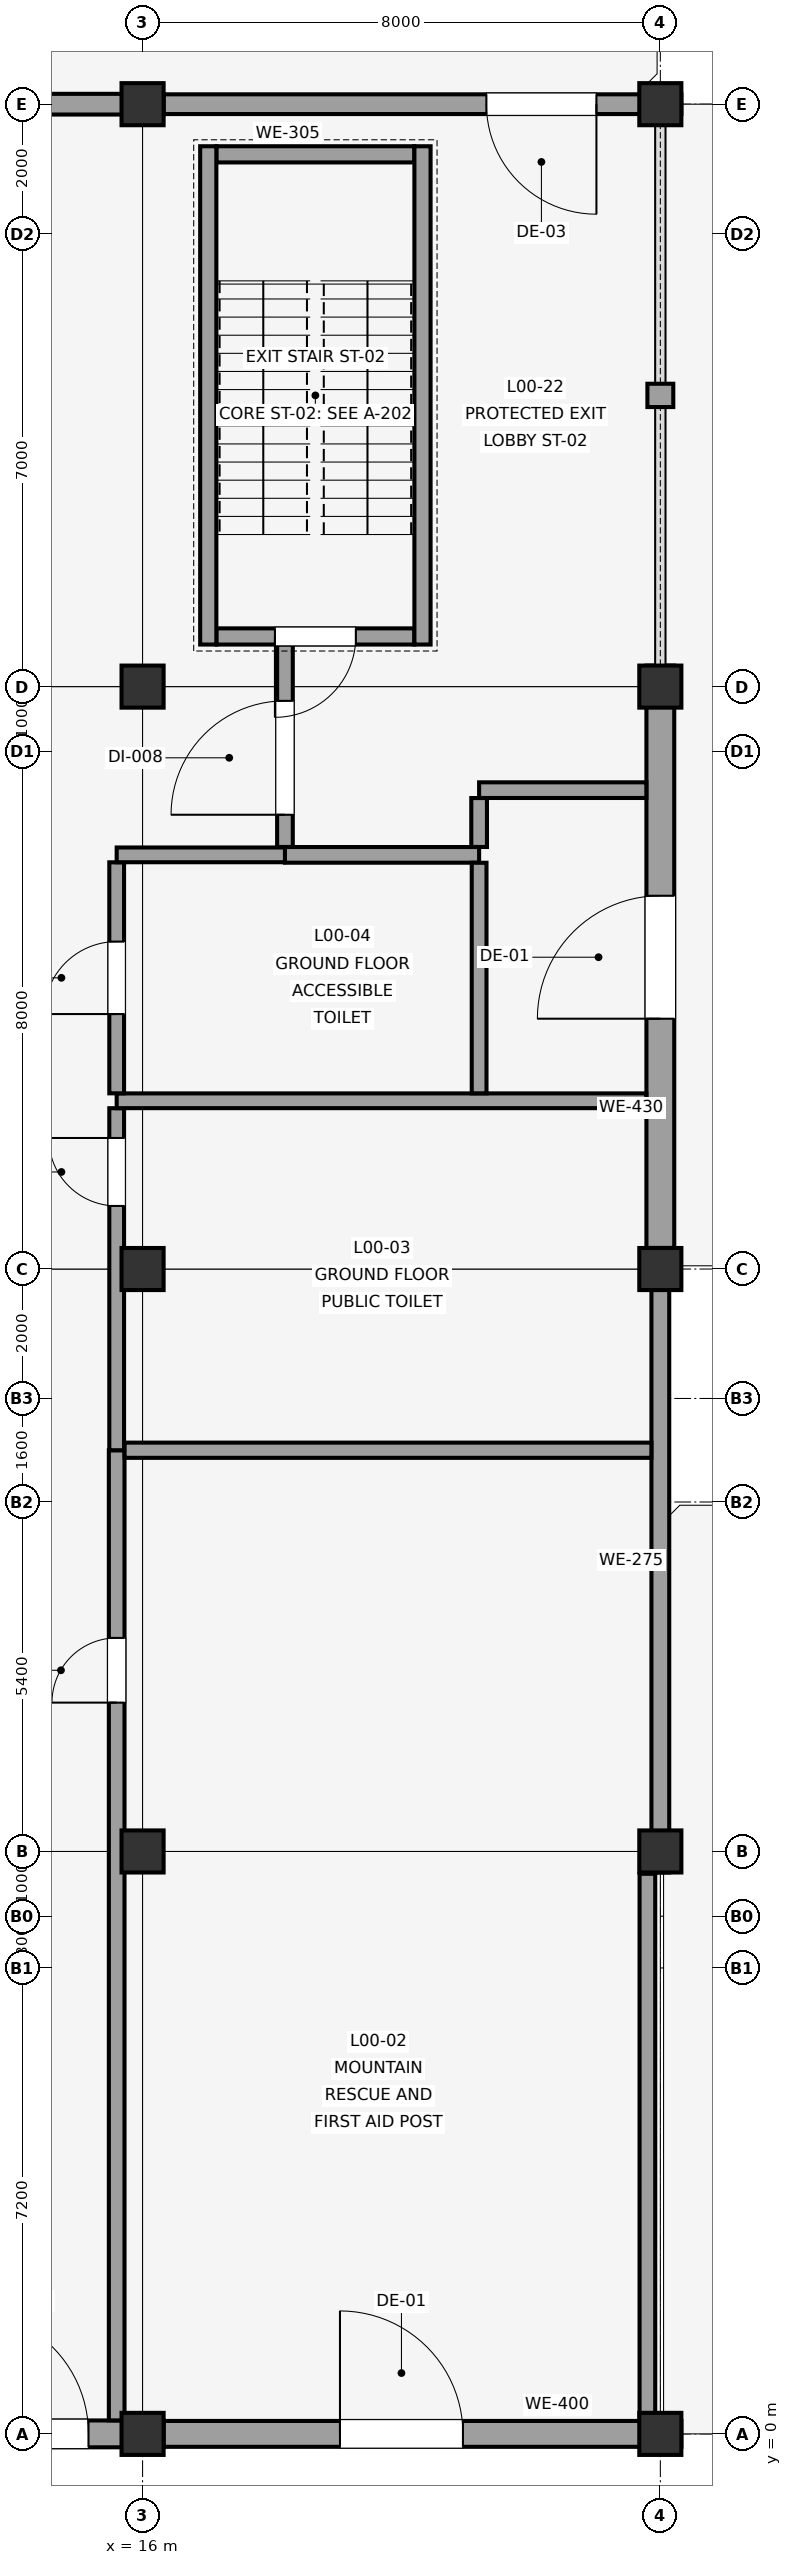
"""IFC4 building model, lengths in metres.
Left out: names, types, materials, properties, quantities, classifications, styles, units other than length and angle.
Written with IfcOpenShell. Run it as: python <this file> out.ifc"""

import sys

from ifc_helpers import new_model, si_unit, direction, frame, frame_2d, origin, origin_2d, place, context, subcontext, project, spatial, rectangle, extrude, element, fill, save


model = new_model("IFC4")
c1 = context("Model", 3, precision=1e-05, world=origin(), true_north=direction((0.0, 1.0)))
c2 = subcontext(c1, "Body", "Model", "MODEL_VIEW")
j1 = project(units=[si_unit("LENGTHUNIT", "METRE"), si_unit("PLANEANGLEUNIT", "RADIAN")], contexts=[c1])
p1 = place(None, origin())
s1 = spatial("IfcSite", under=j1, at=p1, CompositionType="ELEMENT")
p2 = place(p1, origin())
s2 = spatial("IfcBuilding", under=s1, at=p2, CompositionType="ELEMENT")
p3 = place(p2, origin())
s3 = spatial("IfcBuildingStorey", under=s2, at=p3, CompositionType="ELEMENT", Elevation=0.0)
for number, where, z_axis, x_axis in (
    (1, (16.0, 0.0, 0.0), (0.0, 0.0, 1.0), (1.0, 0.0, 0.0)),
    (2, (16.0, 9.0, 0.0), (0.0, 0.0, 1.0), (1.0, 0.0, 0.0)),
    (3, (16.0, 18.0, 0.0), (0.0, 0.0, 1.0), (1.0, 0.0, 0.0)),
    (4, (16.0, 27.0, 0.0), (0.0, 0.0, 1.0), (1.0, 0.0, 0.0)),
    (5, (16.0, 36.0, 0.0), (0.0, 0.0, 1.0), (1.0, 0.0, 0.0)),
    (6, (24.0, 0.0, 0.0), (0.0, 0.0, 1.0), (1.0, 0.0, 0.0)),
    (7, (24.0, 9.0, 0.0), (0.0, 0.0, 1.0), (1.0, 0.0, 0.0)),
    (8, (24.0, 18.0, 0.0), (0.0, 0.0, 1.0), (1.0, 0.0, 0.0)),
    (9, (24.0, 27.0, 0.0), (0.0, 0.0, 1.0), (1.0, 0.0, 0.0)),
    (10, (24.0, 36.0, 0.0), (0.0, 0.0, 1.0), (1.0, 0.0, 0.0)),
):
    element("IfcColumn", number, at=place(p3, frame(where, z_axis=z_axis, x_axis=x_axis)), inside=s3, PredefinedType="COLUMN", context=c2, shape_type="SweptSolid", body=[
        extrude(rectangle(XDim=0.65, YDim=0.65, at=origin_2d()), origin(), (0.0, 0.0, 1.0), 4.5),
    ])
p4 = place(p3, frame((7.675, 0.0, 0.0), z_axis=(0.0, 0.0, 1.0), x_axis=(1.0, 0.0, 0.0)))
e11 = element("IfcWall", 11, at=p4, inside=s3, PredefinedType="SOLIDWALL", context=c2, shape_type="SweptSolid", body=[
    extrude(rectangle(XDim=8.65, YDim=0.415, at=frame_2d((4.325, 0.0))), origin(), (0.0, 0.0, 1.0), 3.12),
])
p5 = place(p4, frame((5.589, 0.0, 0.0)))
e12 = element("IfcOpeningElement", 12, at=p5, cuts=e11, PredefinedType="OPENING", context=c2, shape_type="SweptSolid", body=[
    extrude(rectangle(XDim=1.9, YDim=2.4, at=frame_2d((0.95, 1.2))), frame((0.0, 0.218, 0.0), z_axis=(0.0, -1.0, 0.0), x_axis=(1.0, 0.0, 0.0)), (0.0, 0.0, 1.0), 0.435),
])
p6 = place(p3, frame((16.326, 0.0, 0.0), z_axis=(0.0, 0.0, 1.0), x_axis=(1.0, 0.0, 0.0)))
e13 = element("IfcWall", 13, at=p6, inside=s3, PredefinedType="SOLIDWALL", context=c2, shape_type="SweptSolid", body=[
    extrude(rectangle(XDim=7.999, YDim=0.4, at=frame_2d((4.0, 0.0))), origin(), (0.0, 0.0, 1.0), 3.12),
])
p7 = place(p6, frame((2.724, 0.0, 0.0)))
e14 = element("IfcOpeningElement", 14, at=p7, cuts=e13, PredefinedType="OPENING", context=c2, shape_type="SweptSolid", body=[
    extrude(rectangle(XDim=1.9, YDim=2.4, at=frame_2d((0.95, 1.2))), frame((0.0, 0.21, 0.0), z_axis=(0.0, -1.0, 0.0), x_axis=(1.0, 0.0, 0.0)), (0.0, 0.0, 1.0), 0.42),
])
p8 = place(p3, frame((16.325, 36.0, 0.0), z_axis=(0.0, 0.0, 1.0), x_axis=(-1.0, 0.0, 0.0)))
e15 = element("IfcWall", 15, at=p8, inside=s3, PredefinedType="SOLIDWALL", context=c2, shape_type="SweptSolid", body=[
    extrude(rectangle(XDim=8.65, YDim=0.32, at=frame_2d((4.325, 0.0))), origin(), (0.0, 0.0, 1.0), 3.12),
])
p9 = place(p3, frame((24.325, 36.0, 0.0), z_axis=(0.0, 0.0, 1.0), x_axis=(-1.0, 0.0, 0.0)))
e16 = element("IfcWall", 16, at=p9, inside=s3, PredefinedType="SOLIDWALL", context=c2, shape_type="SweptSolid", body=[
    extrude(rectangle(XDim=7.999, YDim=0.305, at=frame_2d((4.0, 0.0))), origin(), (0.0, 0.0, 1.0), 3.12),
])
p10 = place(p9, frame((1.312, 0.0, 0.0)))
e17 = element("IfcOpeningElement", 17, at=p10, cuts=e16, PredefinedType="OPENING", context=c2, shape_type="SweptSolid", body=[
    extrude(rectangle(XDim=1.7, YDim=2.35, at=frame_2d((0.85, 1.175))), frame((0.0, 0.162, 0.0), z_axis=(0.0, -1.0, 0.0), x_axis=(1.0, 0.0, 0.0)), (0.0, 0.0, 1.0), 0.325),
])
p11 = place(p3, frame((24.0, 8.675, 0.0), z_axis=(0.0, 0.0, 1.0), x_axis=(0.0, 1.0, 0.0)))
e18 = element("IfcWall", 18, at=p11, inside=s3, PredefinedType="SOLIDWALL", context=c2, shape_type="SweptSolid", body=[
    extrude(rectangle(XDim=9.65, YDim=0.275, at=frame_2d((4.825, 0.0))), origin(), (0.0, 0.0, 1.0), 3.12),
])
p12 = place(p3, frame((24.0, 18.326, 0.0), z_axis=(0.0, 0.0, 1.0), x_axis=(0.0, 1.0, 0.0)))
e19 = element("IfcWall", 19, at=p12, inside=s3, PredefinedType="SOLIDWALL", context=c2, shape_type="SweptSolid", body=[
    extrude(rectangle(XDim=8.999, YDim=0.43, at=frame_2d((4.5, 0.0))), origin(), (0.0, 0.0, 1.0), 3.12),
])
p13 = place(p12, frame((3.542, 0.0, 0.0)))
e20 = element("IfcOpeningElement", 20, at=p13, cuts=e19, PredefinedType="OPENING", context=c2, shape_type="SweptSolid", body=[
    extrude(rectangle(XDim=1.9, YDim=2.4, at=frame_2d((0.95, 1.2))), frame((0.0, 0.225, 0.0), z_axis=(0.0, -1.0, 0.0), x_axis=(1.0, 0.0, 0.0)), (0.0, 0.0, 1.0), 0.45),
])
p14 = place(p3, frame((24.0, 31.32, 0.0), z_axis=(0.0, 0.0, 1.0), x_axis=(0.0, 1.0, 0.0)))
e21 = element("IfcWall", 21, at=p14, inside=s3, PredefinedType="SOLIDWALL", context=c2, shape_type="SweptSolid", body=[
    extrude(rectangle(XDim=0.36, YDim=0.4, at=frame_2d((0.18, 0.0))), origin(), (0.0, 0.0, 1.0), 3.12),
])
p15 = place(p3, frame((20.2, 27.775, 0.0), z_axis=(0.0, 0.0, 1.0), x_axis=(-1.0, 0.0, 0.0)))
e22 = element("IfcWall", 22, at=p15, inside=s3, PredefinedType="SHEAR", context=c2, shape_type="SweptSolid", body=[
    extrude(rectangle(XDim=3.06, YDim=0.25, at=frame_2d((1.53, 0.0))), origin(), (0.0, 0.0, 1.0), 4.5),
])
p16 = place(p15, frame((0.905, 0.0, 0.0)))
e23 = element("IfcOpeningElement", 23, at=p16, cuts=e22, PredefinedType="OPENING", context=c2, shape_type="SweptSolid", body=[
    extrude(rectangle(XDim=1.25, YDim=2.15, at=frame_2d((0.625, 1.075))), frame((0.0, 0.135, 0.0), z_axis=(0.0, -1.0, 0.0), x_axis=(1.0, 0.0, 0.0)), (0.0, 0.0, 1.0), 0.27),
])
p17 = place(p3, frame((20.2, 35.225, 0.0), z_axis=(0.0, 0.0, 1.0), x_axis=(-1.0, 0.0, 0.0)))
e24 = element("IfcWall", 24, at=p17, inside=s3, PredefinedType="SHEAR", context=c2, shape_type="SweptSolid", body=[
    extrude(rectangle(XDim=3.06, YDim=0.25, at=frame_2d((1.53, 0.0))), origin(), (0.0, 0.0, 1.0), 4.5),
])
for number, where, z_axis, x_axis in (
    (25, (20.325, 27.65, 0.0), (0.0, 0.0, 1.0), (0.0, 1.0, 0.0)),
    (26, (17.015, 27.65, 0.0), (0.0, 0.0, 1.0), (0.0, 1.0, 0.0)),
):
    element("IfcWall", number, at=place(p3, frame(where, z_axis=z_axis, x_axis=x_axis)), inside=s3, PredefinedType="SHEAR", context=c2, shape_type="SweptSolid", body=[
        extrude(rectangle(XDim=7.7, YDim=0.25, at=frame_2d((3.85, 0.0))), origin(), (0.0, 0.0, 1.0), 4.5),
    ])
p18 = place(p3, frame((18.2, 24.522, 0.0), z_axis=(0.0, 0.0, 1.0), x_axis=(0.0, 1.0, 0.0)))
e27 = element("IfcWall", 27, at=p18, inside=s3, PredefinedType="SOLIDWALL", context=c2, shape_type="SweptSolid", body=[
    extrude(rectangle(XDim=3.127, YDim=0.242, at=frame_2d((1.563, 0.0))), origin(), (0.0, 0.0, 1.0), 2.7),
])
p19 = place(p18, frame((0.498, 0.0, 0.0)))
e28 = element("IfcOpeningElement", 28, at=p19, cuts=e27, PredefinedType="OPENING", context=c2, shape_type="SweptSolid", body=[
    extrude(rectangle(XDim=1.76, YDim=2.22, at=frame_2d((0.88, 1.11))), frame((0.0, 0.131, 0.0), z_axis=(0.0, -1.0, 0.0), x_axis=(1.0, 0.0, 0.0)), (0.0, 0.0, 1.0), 0.262),
])
p20 = place(p3, frame((23.784, 25.4, 0.0), z_axis=(0.0, 0.0, 1.0), x_axis=(-1.0, 0.0, 0.0)))
e29 = element("IfcWall", 29, at=p20, inside=s3, PredefinedType="SOLIDWALL", context=c2, shape_type="SweptSolid", body=[
    extrude(rectangle(XDim=2.584, YDim=0.242, at=frame_2d((1.292, 0.0))), origin(), (0.0, 0.0, 1.0), 2.7),
])
p21 = place(p3, frame((21.2, 25.278, 0.0), z_axis=(0.0, 0.0, 1.0), x_axis=(0.0, -1.0, 0.0)))
e30 = element("IfcWall", 30, at=p21, inside=s3, PredefinedType="SOLIDWALL", context=c2, shape_type="SweptSolid", body=[
    extrude(rectangle(XDim=0.756, YDim=0.242, at=frame_2d((0.378, 0.0))), origin(), (0.0, 0.0, 1.0), 2.7),
])
p22 = place(p3, frame((21.2, 24.4, 0.0), z_axis=(0.0, 0.0, 1.0), x_axis=(-1.0, 0.0, 0.0)))
e31 = element("IfcWall", 31, at=p22, inside=s3, PredefinedType="SOLIDWALL", context=c2, shape_type="SweptSolid", body=[
    extrude(rectangle(XDim=3.0, YDim=0.242, at=frame_2d((1.5, 0.0))), origin(), (0.0, 0.0, 1.0), 2.7),
])
p23 = place(p3, frame((15.6, 0.208, 0.0), z_axis=(0.0, 0.0, 1.0), x_axis=(0.0, 1.0, 0.0)))
e32 = element("IfcWall", 32, at=p23, inside=s3, PredefinedType="SOLIDWALL", context=c2, shape_type="SweptSolid", body=[
    extrude(rectangle(XDim=14.991, YDim=0.242, at=frame_2d((7.496, 0.0))), origin(), (0.0, 0.0, 1.0), 2.7),
])
p24 = place(p23, frame((11.092, 0.0, 0.0)))
e33 = element("IfcOpeningElement", 33, at=p24, cuts=e32, PredefinedType="OPENING", context=c2, shape_type="SweptSolid", body=[
    extrude(rectangle(XDim=1.0, YDim=2.15, at=frame_2d((0.5, 1.075))), frame((0.0, 0.131, 0.0), z_axis=(0.0, -1.0, 0.0), x_axis=(1.0, 0.0, 0.0)), (0.0, 0.0, 1.0), 0.262),
])
p25 = place(p3, frame((15.722, 15.2, 0.0), z_axis=(0.0, 0.0, 1.0), x_axis=(1.0, 0.0, 0.0)))
e34 = element("IfcWall", 34, at=p25, inside=s3, PredefinedType="PARTITIONING", context=c2, shape_type="SweptSolid", body=[
    extrude(rectangle(XDim=8.14, YDim=0.235, at=frame_2d((4.07, 0.0))), origin(), (0.0, 0.0, 1.0), 2.7),
])
p26 = place(p3, frame((23.8, 8.655, 0.0), z_axis=(0.0, 0.0, 1.0), x_axis=(0.0, -1.0, 0.0)))
e35 = element("IfcWall", 35, at=p26, inside=s3, PredefinedType="SOLIDWALL", context=c2, shape_type="SweptSolid", body=[
    extrude(rectangle(XDim=8.454, YDim=0.242, at=frame_2d((4.227, 0.0))), origin(), (0.0, 0.0, 1.0), 2.7),
])
p27 = place(p3, frame((15.6, 15.2, 0.0), z_axis=(0.0, 0.0, 1.0), x_axis=(0.0, 1.0, 0.0)))
e36 = element("IfcWall", 36, at=p27, inside=s3, PredefinedType="PLUMBINGWALL", context=c2, shape_type="SweptSolid", body=[
    extrude(rectangle(XDim=5.285, YDim=0.228, at=frame_2d((2.643, 0.0))), origin(), (0.0, 0.0, 1.0), 2.7),
])
p28 = place(p27, frame((3.775, 0.0, 0.0)))
e37 = element("IfcOpeningElement", 37, at=p28, cuts=e36, PredefinedType="OPENING", context=c2, shape_type="SweptSolid", body=[
    extrude(rectangle(XDim=1.05, YDim=2.15, at=frame_2d((0.525, 1.075))), frame((0.0, 0.124, 0.0), z_axis=(0.0, -1.0, 0.0), x_axis=(1.0, 0.0, 0.0)), (0.0, 0.0, 1.0), 0.248),
])
p29 = place(p3, frame((15.6, 20.6, 0.0), z_axis=(0.0, 0.0, 1.0), x_axis=(1.0, 0.0, 0.0)))
e38 = element("IfcWall", 38, at=p29, inside=s3, PredefinedType="PLUMBINGWALL", context=c2, shape_type="SweptSolid", body=[
    extrude(rectangle(XDim=8.184, YDim=0.228, at=frame_2d((4.092, 0.0))), origin(), (0.0, 0.0, 1.0), 2.7),
])
p30 = place(p3, frame((15.6, 20.715, 0.0), z_axis=(0.0, 0.0, 1.0), x_axis=(0.0, 1.0, 0.0)))
e39 = element("IfcWall", 39, at=p30, inside=s3, PredefinedType="PLUMBINGWALL", context=c2, shape_type="SweptSolid", body=[
    extrude(rectangle(XDim=3.57, YDim=0.228, at=frame_2d((1.785, 0.0))), origin(), (0.0, 0.0, 1.0), 2.7),
])
p31 = place(p30, frame((1.225, 0.0, 0.0)))
e40 = element("IfcOpeningElement", 40, at=p31, cuts=e39, PredefinedType="OPENING", context=c2, shape_type="SweptSolid", body=[
    extrude(rectangle(XDim=1.12, YDim=2.18, at=frame_2d((0.56, 1.09))), frame((0.0, 0.124, 0.0), z_axis=(0.0, -1.0, 0.0), x_axis=(1.0, 0.0, 0.0)), (0.0, 0.0, 1.0), 0.248),
])
p32 = place(p3, frame((15.6, 24.4, 0.0), z_axis=(0.0, 0.0, 1.0), x_axis=(1.0, 0.0, 0.0)))
e41 = element("IfcWall", 41, at=p32, inside=s3, PredefinedType="PLUMBINGWALL", context=c2, shape_type="SweptSolid", body=[
    extrude(rectangle(XDim=2.6, YDim=0.228, at=frame_2d((1.3, 0.0))), origin(), (0.0, 0.0, 1.0), 2.7),
])
p33 = place(p3, frame((21.2, 24.278, 0.0), z_axis=(0.0, 0.0, 1.0), x_axis=(0.0, -1.0, 0.0)))
e42 = element("IfcWall", 42, at=p33, inside=s3, PredefinedType="PLUMBINGWALL", context=c2, shape_type="SweptSolid", body=[
    extrude(rectangle(XDim=3.563, YDim=0.228, at=frame_2d((1.781, 0.0))), origin(), (0.0, 0.0, 1.0), 2.7),
])
p34 = place(p5, origin())
e43 = element("IfcDoor", 43, at=p34, inside=s3, OperationType="DOUBLE_SWING_LEFT", PredefinedType="DOOR", context=c2, shape_type="SweptSolid", body=[
    extrude(rectangle(XDim=1.9, YDim=2.4, at=frame_2d((0.95, 1.2))), frame((0.0, 0.025, 0.0), z_axis=(0.0, -1.0, 0.0), x_axis=(1.0, 0.0, 0.0)), (0.0, 0.0, 1.0), 0.05),
])
fill(e12, e43)
p35 = place(p7, origin())
e44 = element("IfcDoor", 44, at=p35, inside=s3, OperationType="DOUBLE_SWING_LEFT", PredefinedType="DOOR", context=c2, shape_type="SweptSolid", body=[
    extrude(rectangle(XDim=1.9, YDim=2.4, at=frame_2d((0.95, 1.2))), frame((0.0, 0.025, 0.0), z_axis=(0.0, -1.0, 0.0), x_axis=(1.0, 0.0, 0.0)), (0.0, 0.0, 1.0), 0.05),
])
fill(e14, e44)
p36 = place(p10, origin())
e45 = element("IfcDoor", 45, at=p36, inside=s3, OperationType="DOUBLE_SWING_LEFT", PredefinedType="DOOR", context=c2, shape_type="SweptSolid", body=[
    extrude(rectangle(XDim=1.7, YDim=2.35, at=frame_2d((0.85, 1.175))), frame((0.0, 0.025, 0.0), z_axis=(0.0, -1.0, 0.0), x_axis=(1.0, 0.0, 0.0)), (0.0, 0.0, 1.0), 0.05),
])
fill(e17, e45)
p37 = place(p13, origin())
e46 = element("IfcDoor", 46, at=p37, inside=s3, OperationType="DOUBLE_SWING_LEFT", PredefinedType="DOOR", context=c2, shape_type="SweptSolid", body=[
    extrude(rectangle(XDim=1.9, YDim=2.4, at=frame_2d((0.95, 1.2))), frame((0.0, 0.025, 0.0), z_axis=(0.0, -1.0, 0.0), x_axis=(1.0, 0.0, 0.0)), (0.0, 0.0, 1.0), 0.05),
])
fill(e20, e46)
p38 = place(p16, origin())
e47 = element("IfcDoor", 47, at=p38, inside=s3, OperationType="SINGLE_SWING_RIGHT", PredefinedType="DOOR", context=c2, shape_type="SweptSolid", body=[
    extrude(rectangle(XDim=1.25, YDim=2.15, at=frame_2d((0.625, 1.075))), frame((0.0, 0.025, 0.0), z_axis=(0.0, -1.0, 0.0), x_axis=(1.0, 0.0, 0.0)), (0.0, 0.0, 1.0), 0.05),
])
fill(e23, e47)
p39 = place(p19, origin())
e48 = element("IfcDoor", 48, at=p39, inside=s3, OperationType="SINGLE_SWING_LEFT", PredefinedType="DOOR", context=c2, shape_type="SweptSolid", body=[
    extrude(rectangle(XDim=1.76, YDim=2.22, at=frame_2d((0.88, 1.11))), frame((0.0, 0.025, 0.0), z_axis=(0.0, -1.0, 0.0), x_axis=(1.0, 0.0, 0.0)), (0.0, 0.0, 1.0), 0.05),
])
fill(e28, e48)
p40 = place(p24, origin())
e49 = element("IfcDoor", 49, at=p40, inside=s3, OperationType="SINGLE_SWING_LEFT", PredefinedType="DOOR", context=c2, shape_type="SweptSolid", body=[
    extrude(rectangle(XDim=1.0, YDim=2.15, at=frame_2d((0.5, 1.075))), frame((0.0, 0.025, 0.0), z_axis=(0.0, -1.0, 0.0), x_axis=(1.0, 0.0, 0.0)), (0.0, 0.0, 1.0), 0.05),
])
fill(e33, e49)
p41 = place(p28, origin())
e50 = element("IfcDoor", 50, at=p41, inside=s3, OperationType="SINGLE_SWING_RIGHT", PredefinedType="DOOR", context=c2, shape_type="SweptSolid", body=[
    extrude(rectangle(XDim=1.05, YDim=2.15, at=frame_2d((0.525, 1.075))), frame((0.0, 0.025, 0.0), z_axis=(0.0, -1.0, 0.0), x_axis=(1.0, 0.0, 0.0)), (0.0, 0.0, 1.0), 0.05),
])
fill(e37, e50)
p42 = place(p31, origin())
e51 = element("IfcDoor", 51, at=p42, inside=s3, OperationType="SINGLE_SWING_LEFT", PredefinedType="DOOR", context=c2, shape_type="SweptSolid", body=[
    extrude(rectangle(XDim=1.12, YDim=2.18, at=frame_2d((0.56, 1.09))), frame((0.0, 0.025, 0.0), z_axis=(0.0, -1.0, 0.0), x_axis=(1.0, 0.0, 0.0)), (0.0, 0.0, 1.0), 0.05),
])
fill(e40, e51)
save(model, sys.argv[1])
